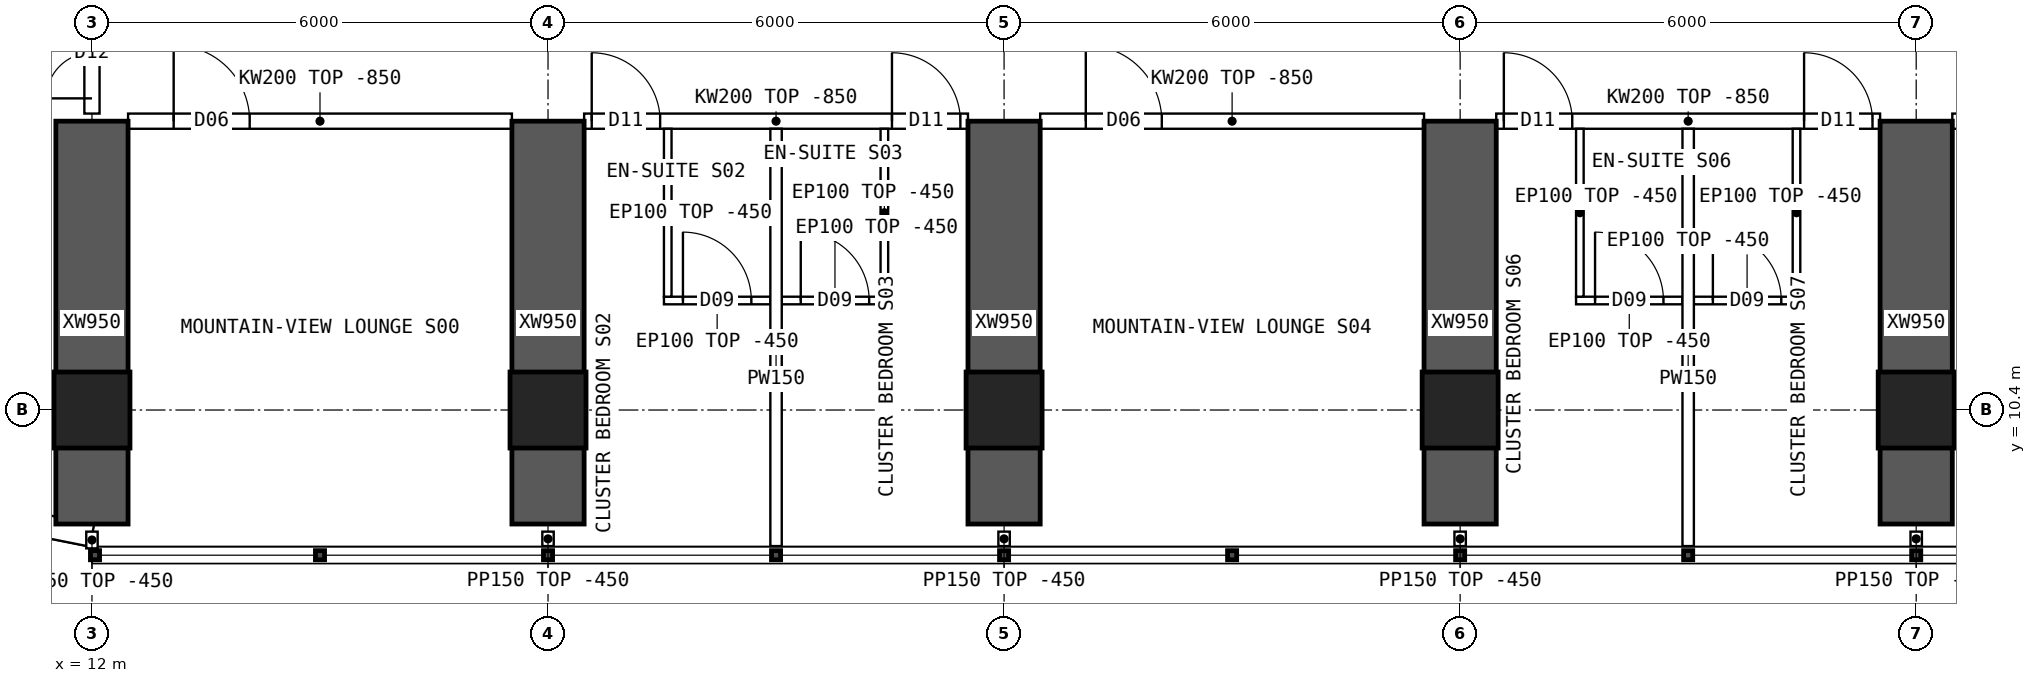
"""IFC4 building model, lengths in metres.
Left out: names, types, materials, properties, quantities, classifications, styles, units other than length and angle.
Written with IfcOpenShell. Run it as: python <this file> out.ifc"""

import sys

from ifc_helpers import new_model, si_unit, direction, frame, frame_2d, origin, origin_2d, place, context, subcontext, project, spatial, polyline, rectangle, hollow_rectangle, outline, extrude, element, fill, save


model = new_model("IFC4")
c1 = context("Model", 3, precision=1e-05, world=origin(), true_north=direction((0.0, 1.0)))
c2 = subcontext(c1, "Body", "Model", "MODEL_VIEW")
j1 = project(units=[si_unit("LENGTHUNIT", "METRE"), si_unit("PLANEANGLEUNIT", "RADIAN")], contexts=[c1])
p1 = place(None, origin())
s1 = spatial("IfcSite", under=j1, at=p1, CompositionType="ELEMENT")
p2 = place(p1, origin())
s2 = spatial("IfcBuilding", under=s1, at=p2, CompositionType="ELEMENT")
p3 = place(p2, frame((0.0, 0.0, 95.65)))
s3 = spatial("IfcBuildingStorey", under=s2, at=p3, CompositionType="ELEMENT", Elevation=95.65)
for number, where, z_axis, x_axis in (
    (1, (12.0, 10.4, 0.0), (0.0, 0.0, 1.0), (1.0, 0.0, 0.0)),
    (2, (18.0, 10.4, 0.0), (0.0, 0.0, 1.0), (1.0, 0.0, 0.0)),
    (3, (24.0, 10.4, 0.0), (0.0, 0.0, 1.0), (1.0, 0.0, 0.0)),
    (4, (30.0, 10.4, 0.0), (0.0, 0.0, 1.0), (1.0, 0.0, 0.0)),
    (5, (36.0, 10.4, 0.0), (0.0, 0.0, 1.0), (1.0, 0.0, 0.0)),
):
    element("IfcColumn", number, at=place(p3, frame(where, z_axis=z_axis, x_axis=x_axis)), inside=s3, PredefinedType="COLUMN", context=c2, shape_type="SweptSolid", body=[
        extrude(hollow_rectangle(XDim=1.0, YDim=1.0, WallThickness=0.1, at=origin_2d()), origin(), (0.0, 0.0, 1.0), 3.75),
    ])
for number, where, z_axis, x_axis in (
    (6, (12.0, 8.9, 0.0), (0.0, 0.0, 1.0), (0.0, 1.0, 0.0)),
    (7, (18.0, 8.9, 0.0), (0.0, 0.0, 1.0), (0.0, 1.0, 0.0)),
    (8, (24.0, 8.9, 0.0), (0.0, 0.0, 1.0), (0.0, 1.0, 0.0)),
    (9, (30.0, 8.9, 0.0), (0.0, 0.0, 1.0), (0.0, 1.0, 0.0)),
    (10, (36.0, 8.9, 0.0), (0.0, 0.0, 1.0), (0.0, 1.0, 0.0)),
):
    element("IfcWall", number, at=place(p3, frame(where, z_axis=z_axis, x_axis=x_axis)), inside=s3, PredefinedType="SHEAR", context=c2, shape_type="SweptSolid", body=[
        extrude(rectangle(XDim=5.3, YDim=0.95, at=frame_2d((2.65, 0.0))), origin(), (0.0, 0.0, 1.0), 3.75),
    ])
p4 = place(p3, frame((8.843, 9.378, 0.0), z_axis=(0.0, 0.0, 1.0), x_axis=(0.980787251524, -0.195080412259, 0.0)))
e11 = element("IfcWall", 11, at=p4, inside=s3, PredefinedType="SOLIDWALL", context=c2, shape_type="SweptSolid", body=[
    extrude(outline(polyline([(-0.03, -0.15), (3.249, -0.15), (3.189, 0.15), (0.03, 0.15), (-0.03, -0.15)])), origin(), (0.0, 0.0, 1.0), 3.3),
])
p5 = place(p4, frame((0.909, 0.0, 0.9)))
e12 = element("IfcOpeningElement", 12, at=p5, cuts=e11, PredefinedType="OPENING", context=c2, shape_type="SweptSolid", body=[
    extrude(rectangle(XDim=1.4, YDim=1.8, at=frame_2d((0.7, 0.9))), frame((0.0, 0.16, 0.0), z_axis=(0.0, -1.0, 0.0), x_axis=(1.0, 0.0, 0.0)), (0.0, 0.0, 1.0), 0.32),
])
p6 = place(p3, frame((12.475, 14.2, 0.0), z_axis=(0.0, 0.0, 1.0), x_axis=(1.0, 0.0, 0.0)))
e13 = element("IfcWall", 13, at=p6, inside=s3, PredefinedType="SOLIDWALL", context=c2, shape_type="SweptSolid", body=[
    extrude(outline(polyline([(0.0, 0.0), (5.05, 0.0), (5.05, 2.9), (0.0, 2.9), (0.0, 0.0)])), frame((0.0, 0.1, 0.0), z_axis=(0.0, -1.0, 0.0), x_axis=(1.0, 0.0, 0.0)), (0.0, 0.0, 1.0), 0.2),
])
p7 = place(p6, frame((0.6, 0.0, 0.0)))
e14 = element("IfcOpeningElement", 14, at=p7, cuts=e13, PredefinedType="OPENING", context=c2, shape_type="SweptSolid", body=[
    extrude(rectangle(XDim=1.0, YDim=2.1, at=frame_2d((0.5, 1.05))), frame((0.0, 0.11, 0.0), z_axis=(0.0, -1.0, 0.0), x_axis=(1.0, 0.0, 0.0)), (0.0, 0.0, 1.0), 0.22),
])
p8 = place(p3, frame((18.475, 14.2, 0.0), z_axis=(0.0, 0.0, 1.0), x_axis=(1.0, 0.0, 0.0)))
e15 = element("IfcWall", 15, at=p8, inside=s3, PredefinedType="SOLIDWALL", context=c2, shape_type="SweptSolid", body=[
    extrude(outline(polyline([(0.0, 0.0), (5.05, 0.0), (5.05, 2.9), (0.0, 2.9), (0.0, 0.0)])), frame((0.0, 0.1, 0.0), z_axis=(0.0, -1.0, 0.0), x_axis=(1.0, 0.0, 0.0)), (0.0, 0.0, 1.0), 0.2),
])
p9 = place(p8, frame((0.1, 0.0, 0.0)))
e16 = element("IfcOpeningElement", 16, at=p9, cuts=e15, PredefinedType="OPENING", context=c2, shape_type="SweptSolid", body=[
    extrude(rectangle(XDim=0.9, YDim=2.1, at=frame_2d((0.45, 1.05))), frame((0.0, 0.11, 0.0), z_axis=(0.0, -1.0, 0.0), x_axis=(1.0, 0.0, 0.0)), (0.0, 0.0, 1.0), 0.22),
])
p10 = place(p8, frame((4.05, 0.0, 0.0)))
e17 = element("IfcOpeningElement", 17, at=p10, cuts=e15, PredefinedType="OPENING", context=c2, shape_type="SweptSolid", body=[
    extrude(rectangle(XDim=0.9, YDim=2.1, at=frame_2d((0.45, 1.05))), frame((0.0, 0.11, 0.0), z_axis=(0.0, -1.0, 0.0), x_axis=(1.0, 0.0, 0.0)), (0.0, 0.0, 1.0), 0.22),
])
p11 = place(p3, frame((24.475, 14.2, 0.0), z_axis=(0.0, 0.0, 1.0), x_axis=(1.0, 0.0, 0.0)))
e18 = element("IfcWall", 18, at=p11, inside=s3, PredefinedType="SOLIDWALL", context=c2, shape_type="SweptSolid", body=[
    extrude(outline(polyline([(0.0, 0.0), (5.05, 0.0), (5.05, 2.9), (0.0, 2.9), (0.0, 0.0)])), frame((0.0, 0.1, 0.0), z_axis=(0.0, -1.0, 0.0), x_axis=(1.0, 0.0, 0.0)), (0.0, 0.0, 1.0), 0.2),
])
p12 = place(p11, frame((0.6, 0.0, 0.0)))
e19 = element("IfcOpeningElement", 19, at=p12, cuts=e18, PredefinedType="OPENING", context=c2, shape_type="SweptSolid", body=[
    extrude(rectangle(XDim=1.0, YDim=2.1, at=frame_2d((0.5, 1.05))), frame((0.0, 0.11, 0.0), z_axis=(0.0, -1.0, 0.0), x_axis=(1.0, 0.0, 0.0)), (0.0, 0.0, 1.0), 0.22),
])
p13 = place(p3, frame((30.475, 14.2, 0.0), z_axis=(0.0, 0.0, 1.0), x_axis=(1.0, 0.0, 0.0)))
e20 = element("IfcWall", 20, at=p13, inside=s3, PredefinedType="SOLIDWALL", context=c2, shape_type="SweptSolid", body=[
    extrude(outline(polyline([(0.0, 0.0), (5.05, 0.0), (5.05, 2.9), (0.0, 2.9), (0.0, 0.0)])), frame((0.0, 0.1, 0.0), z_axis=(0.0, -1.0, 0.0), x_axis=(1.0, 0.0, 0.0)), (0.0, 0.0, 1.0), 0.2),
])
p14 = place(p13, frame((0.1, 0.0, 0.0)))
e21 = element("IfcOpeningElement", 21, at=p14, cuts=e20, PredefinedType="OPENING", context=c2, shape_type="SweptSolid", body=[
    extrude(rectangle(XDim=0.9, YDim=2.1, at=frame_2d((0.45, 1.05))), frame((0.0, 0.11, 0.0), z_axis=(0.0, -1.0, 0.0), x_axis=(1.0, 0.0, 0.0)), (0.0, 0.0, 1.0), 0.22),
])
p15 = place(p13, frame((4.05, 0.0, 0.0)))
e22 = element("IfcOpeningElement", 22, at=p15, cuts=e20, PredefinedType="OPENING", context=c2, shape_type="SweptSolid", body=[
    extrude(rectangle(XDim=0.9, YDim=2.1, at=frame_2d((0.45, 1.05))), frame((0.0, 0.11, 0.0), z_axis=(0.0, -1.0, 0.0), x_axis=(1.0, 0.0, 0.0)), (0.0, 0.0, 1.0), 0.22),
])
p16 = place(p3, frame((36.475, 14.2, 0.0), z_axis=(0.0, 0.0, 1.0), x_axis=(1.0, 0.0, 0.0)))
e23 = element("IfcWall", 23, at=p16, inside=s3, PredefinedType="SOLIDWALL", context=c2, shape_type="SweptSolid", body=[
    extrude(outline(polyline([(0.0, 0.0), (5.05, 0.0), (5.05, 2.9), (0.0, 2.9), (0.0, 0.0)])), frame((0.0, 0.1, 0.0), z_axis=(0.0, -1.0, 0.0), x_axis=(1.0, 0.0, 0.0)), (0.0, 0.0, 1.0), 0.2),
])
p17 = place(p16, frame((0.3, 0.0, 0.0)))
e24 = element("IfcOpeningElement", 24, at=p17, cuts=e23, PredefinedType="OPENING", context=c2, shape_type="SweptSolid", body=[
    extrude(rectangle(XDim=1.0, YDim=2.1, at=frame_2d((0.5, 1.05))), frame((0.0, 0.11, 0.0), z_axis=(0.0, -1.0, 0.0), x_axis=(1.0, 0.0, 0.0)), (0.0, 0.0, 1.0), 0.22),
])
p18 = place(p3, frame((21.0, 8.61, 0.0), z_axis=(0.0, 0.0, 1.0), x_axis=(0.0, 1.0, 0.0)))
e25 = element("IfcWall", 25, at=p18, inside=s3, PredefinedType="PARTITIONING", context=c2, shape_type="SweptSolid", body=[
    extrude(outline(polyline([(0.0, 0.0), (5.49, 0.0), (5.49, 2.9), (5.442, 2.9), (5.44, 3.3), (1.992, 3.3), (1.99, 2.9), (1.592, 2.9), (1.59, 3.3), (0.0, 3.3), (0.0, 0.0)])), frame((0.0, 0.075, 0.0), z_axis=(0.0, -1.0, 0.0), x_axis=(1.0, 0.0, 0.0)), (0.0, 0.0, 1.0), 0.15),
])
p19 = place(p3, frame((20.925, 11.841, 0.0), z_axis=(0.0, 0.0, 1.0), x_axis=(-1.0, 0.0, 0.0)))
e26 = element("IfcWall", 26, at=p19, inside=s3, PredefinedType="PARTITIONING", context=c2, shape_type="SweptSolid", body=[
    extrude(rectangle(XDim=1.4, YDim=0.1, at=frame_2d((0.7, 0.0))), origin(), (0.0, 0.0, 1.0), 3.3),
])
p20 = place(p19, frame((0.25, 0.0, 0.0)))
e27 = element("IfcOpeningElement", 27, at=p20, cuts=e26, PredefinedType="OPENING", context=c2, shape_type="SweptSolid", body=[
    extrude(rectangle(XDim=0.9, YDim=2.1, at=frame_2d((0.45, 1.05))), frame((0.0, 0.06, 0.0), z_axis=(0.0, -1.0, 0.0), x_axis=(1.0, 0.0, 0.0)), (0.0, 0.0, 1.0), 0.12),
])
p21 = place(p3, frame((19.575, 11.891, 0.0), z_axis=(0.0, 0.0, 1.0), x_axis=(0.0, 1.0, 0.0)))
e28 = element("IfcWall", 28, at=p21, inside=s3, PredefinedType="PARTITIONING", context=c2, shape_type="SweptSolid", body=[
    extrude(outline(polyline([(0.0, 0.0), (2.209, 0.0), (2.209, 2.9), (2.161, 2.9), (2.159, 3.3), (0.0, 3.3), (0.0, 0.0)])), frame((0.0, 0.05, 0.0), z_axis=(0.0, -1.0, 0.0), x_axis=(1.0, 0.0, 0.0)), (0.0, 0.0, 1.0), 0.1),
])
p22 = place(p3, frame((22.475, 11.841, 0.0), z_axis=(0.0, 0.0, 1.0), x_axis=(-1.0, 0.0, 0.0)))
e29 = element("IfcWall", 29, at=p22, inside=s3, PredefinedType="PARTITIONING", context=c2, shape_type="SweptSolid", body=[
    extrude(rectangle(XDim=1.4, YDim=0.1, at=frame_2d((0.7, 0.0))), origin(), (0.0, 0.0, 1.0), 3.3),
])
p23 = place(p22, frame((0.25, 0.0, 0.0)))
e30 = element("IfcOpeningElement", 30, at=p23, cuts=e29, PredefinedType="OPENING", context=c2, shape_type="SweptSolid", body=[
    extrude(rectangle(XDim=0.9, YDim=2.1, at=frame_2d((0.45, 1.05))), frame((0.0, 0.06, 0.0), z_axis=(0.0, -1.0, 0.0), x_axis=(1.0, 0.0, 0.0)), (0.0, 0.0, 1.0), 0.12),
])
p24 = place(p3, frame((22.425, 11.891, 0.0), z_axis=(0.0, 0.0, 1.0), x_axis=(0.0, 1.0, 0.0)))
e31 = element("IfcWall", 31, at=p24, inside=s3, PredefinedType="PARTITIONING", context=c2, shape_type="SweptSolid", body=[
    extrude(outline(polyline([(0.0, 0.0), (2.209, 0.0), (2.209, 2.9), (2.161, 2.9), (2.159, 3.3), (0.0, 3.3), (0.0, 0.0)])), frame((0.0, 0.05, 0.0), z_axis=(0.0, -1.0, 0.0), x_axis=(1.0, 0.0, 0.0)), (0.0, 0.0, 1.0), 0.1),
])
p25 = place(p3, frame((33.0, 8.61, 0.0), z_axis=(0.0, 0.0, 1.0), x_axis=(0.0, 1.0, 0.0)))
e32 = element("IfcWall", 32, at=p25, inside=s3, PredefinedType="PARTITIONING", context=c2, shape_type="SweptSolid", body=[
    extrude(outline(polyline([(0.0, 0.0), (5.49, 0.0), (5.49, 2.9), (5.442, 2.9), (5.44, 3.3), (1.992, 3.3), (1.99, 2.9), (1.592, 2.9), (1.59, 3.3), (0.0, 3.3), (0.0, 0.0)])), frame((0.0, 0.075, 0.0), z_axis=(0.0, -1.0, 0.0), x_axis=(1.0, 0.0, 0.0)), (0.0, 0.0, 1.0), 0.15),
])
p26 = place(p3, frame((32.925, 11.841, 0.0), z_axis=(0.0, 0.0, 1.0), x_axis=(-1.0, 0.0, 0.0)))
e33 = element("IfcWall", 33, at=p26, inside=s3, PredefinedType="PARTITIONING", context=c2, shape_type="SweptSolid", body=[
    extrude(rectangle(XDim=1.4, YDim=0.1, at=frame_2d((0.7, 0.0))), origin(), (0.0, 0.0, 1.0), 3.3),
])
p27 = place(p26, frame((0.25, 0.0, 0.0)))
e34 = element("IfcOpeningElement", 34, at=p27, cuts=e33, PredefinedType="OPENING", context=c2, shape_type="SweptSolid", body=[
    extrude(rectangle(XDim=0.9, YDim=2.1, at=frame_2d((0.45, 1.05))), frame((0.0, 0.06, 0.0), z_axis=(0.0, -1.0, 0.0), x_axis=(1.0, 0.0, 0.0)), (0.0, 0.0, 1.0), 0.12),
])
p28 = place(p3, frame((31.575, 11.891, 0.0), z_axis=(0.0, 0.0, 1.0), x_axis=(0.0, 1.0, 0.0)))
e35 = element("IfcWall", 35, at=p28, inside=s3, PredefinedType="PARTITIONING", context=c2, shape_type="SweptSolid", body=[
    extrude(outline(polyline([(0.0, 0.0), (2.209, 0.0), (2.209, 2.9), (2.161, 2.9), (2.159, 3.3), (0.0, 3.3), (0.0, 0.0)])), frame((0.0, 0.05, 0.0), z_axis=(0.0, -1.0, 0.0), x_axis=(1.0, 0.0, 0.0)), (0.0, 0.0, 1.0), 0.1),
])
p29 = place(p3, frame((34.475, 11.841, 0.0), z_axis=(0.0, 0.0, 1.0), x_axis=(-1.0, 0.0, 0.0)))
e36 = element("IfcWall", 36, at=p29, inside=s3, PredefinedType="PARTITIONING", context=c2, shape_type="SweptSolid", body=[
    extrude(rectangle(XDim=1.4, YDim=0.1, at=frame_2d((0.7, 0.0))), origin(), (0.0, 0.0, 1.0), 3.3),
])
p30 = place(p29, frame((0.25, 0.0, 0.0)))
e37 = element("IfcOpeningElement", 37, at=p30, cuts=e36, PredefinedType="OPENING", context=c2, shape_type="SweptSolid", body=[
    extrude(rectangle(XDim=0.9, YDim=2.1, at=frame_2d((0.45, 1.05))), frame((0.0, 0.06, 0.0), z_axis=(0.0, -1.0, 0.0), x_axis=(1.0, 0.0, 0.0)), (0.0, 0.0, 1.0), 0.12),
])
p31 = place(p3, frame((34.425, 11.891, 0.0), z_axis=(0.0, 0.0, 1.0), x_axis=(0.0, 1.0, 0.0)))
e38 = element("IfcWall", 38, at=p31, inside=s3, PredefinedType="PARTITIONING", context=c2, shape_type="SweptSolid", body=[
    extrude(outline(polyline([(0.0, 0.0), (2.209, 0.0), (2.209, 2.9), (2.161, 2.9), (2.159, 3.3), (0.0, 3.3), (0.0, 0.0)])), frame((0.0, 0.05, 0.0), z_axis=(0.0, -1.0, 0.0), x_axis=(1.0, 0.0, 0.0)), (0.0, 0.0, 1.0), 0.1),
])
p32 = place(p3, frame((12.0, 14.3, 0.0), z_axis=(0.0, 0.0, 1.0), x_axis=(0.0, 1.0, 0.0)))
e39 = element("IfcWall", 39, at=p32, inside=s3, PredefinedType="SOLIDWALL", context=c2, shape_type="SweptSolid", body=[
    extrude(outline(polyline([(0.0, 0.0), (1.6, 0.0), (1.6, 2.9), (0.0, 2.9), (0.0, 0.0)])), frame((0.0, 0.1, 0.0), z_axis=(0.0, -1.0, 0.0), x_axis=(1.0, 0.0, 0.0)), (0.0, 0.0, 1.0), 0.2),
])
p33 = place(p32, frame((0.2, 0.0, 0.0)))
e40 = element("IfcOpeningElement", 40, at=p33, cuts=e39, PredefinedType="OPENING", context=c2, shape_type="SweptSolid", body=[
    extrude(rectangle(XDim=1.2, YDim=2.1, at=frame_2d((0.6, 1.05))), frame((0.0, 0.11, 0.0), z_axis=(0.0, -1.0, 0.0), x_axis=(1.0, 0.0, 0.0)), (0.0, 0.0, 1.0), 0.22),
])
p34 = place(p3, frame((12.0, 8.8, 0.0), z_axis=(0.0, 0.0, 1.0), x_axis=(0.0, -1.0, 0.0)))
e41 = element("IfcWall", 41, at=p34, inside=s3, PredefinedType="PARTITIONING", context=c2, shape_type="SweptSolid", body=[
    extrude(rectangle(XDim=0.22, YDim=0.15, at=frame_2d((0.11, 0.0))), origin(), (0.0, 0.0, 1.0), 3.3),
])
for number, where, z_axis, x_axis in (
    (42, (18.0, 8.8, 0.0), (0.0, 0.0, 1.0), (0.0, -1.0, 0.0)),
    (43, (24.0, 8.8, 0.0), (0.0, 0.0, 1.0), (0.0, -1.0, 0.0)),
    (44, (30.0, 8.8, 0.0), (0.0, 0.0, 1.0), (0.0, -1.0, 0.0)),
    (45, (36.0, 8.8, 0.0), (0.0, 0.0, 1.0), (0.0, -1.0, 0.0)),
):
    element("IfcWall", number, at=place(p3, frame(where, z_axis=z_axis, x_axis=x_axis)), inside=s3, PredefinedType="PARTITIONING", context=c2, shape_type="SweptSolid", body=[
        extrude(rectangle(XDim=0.19, YDim=0.15, at=frame_2d((0.095, 0.0))), origin(), (0.0, 0.0, 1.0), 3.3),
    ])
p35 = place(p7, origin())
e46 = element("IfcDoor", 46, at=p35, inside=s3, OperationType="SINGLE_SWING_LEFT", PredefinedType="DOOR", context=c2, shape_type="SweptSolid", body=[
    extrude(rectangle(XDim=1.0, YDim=2.1, at=frame_2d((0.5, 1.05))), frame((0.0, 0.025, 0.0), z_axis=(0.0, -1.0, 0.0), x_axis=(1.0, 0.0, 0.0)), (0.0, 0.0, 1.0), 0.05),
])
fill(e14, e46)
p36 = place(p20, origin())
e47 = element("IfcDoor", 47, at=p36, inside=s3, OperationType="SINGLE_SWING_RIGHT", PredefinedType="DOOR", context=c2, shape_type="SweptSolid", body=[
    extrude(rectangle(XDim=0.9, YDim=2.1, at=frame_2d((0.45, 1.05))), frame((0.0, 0.025, 0.0), z_axis=(0.0, -1.0, 0.0), x_axis=(1.0, 0.0, 0.0)), (0.0, 0.0, 1.0), 0.05),
])
fill(e27, e47)
p37 = place(p9, origin())
e48 = element("IfcDoor", 48, at=p37, inside=s3, OperationType="SINGLE_SWING_LEFT", PredefinedType="DOOR", context=c2, shape_type="SweptSolid", body=[
    extrude(rectangle(XDim=0.9, YDim=2.1, at=frame_2d((0.45, 1.05))), frame((0.0, 0.025, 0.0), z_axis=(0.0, -1.0, 0.0), x_axis=(1.0, 0.0, 0.0)), (0.0, 0.0, 1.0), 0.05),
])
fill(e16, e48)
p38 = place(p23, origin())
e49 = element("IfcDoor", 49, at=p38, inside=s3, OperationType="SINGLE_SWING_RIGHT", PredefinedType="DOOR", context=c2, shape_type="SweptSolid", body=[
    extrude(rectangle(XDim=0.9, YDim=2.1, at=frame_2d((0.45, 1.05))), frame((0.0, 0.025, 0.0), z_axis=(0.0, -1.0, 0.0), x_axis=(1.0, 0.0, 0.0)), (0.0, 0.0, 1.0), 0.05),
])
fill(e30, e49)
p39 = place(p10, origin())
e50 = element("IfcDoor", 50, at=p39, inside=s3, OperationType="SINGLE_SWING_LEFT", PredefinedType="DOOR", context=c2, shape_type="SweptSolid", body=[
    extrude(rectangle(XDim=0.9, YDim=2.1, at=frame_2d((0.45, 1.05))), frame((0.0, 0.025, 0.0), z_axis=(0.0, -1.0, 0.0), x_axis=(1.0, 0.0, 0.0)), (0.0, 0.0, 1.0), 0.05),
])
fill(e17, e50)
p40 = place(p12, origin())
e51 = element("IfcDoor", 51, at=p40, inside=s3, OperationType="SINGLE_SWING_LEFT", PredefinedType="DOOR", context=c2, shape_type="SweptSolid", body=[
    extrude(rectangle(XDim=1.0, YDim=2.1, at=frame_2d((0.5, 1.05))), frame((0.0, 0.025, 0.0), z_axis=(0.0, -1.0, 0.0), x_axis=(1.0, 0.0, 0.0)), (0.0, 0.0, 1.0), 0.05),
])
fill(e19, e51)
p41 = place(p27, origin())
e52 = element("IfcDoor", 52, at=p41, inside=s3, OperationType="SINGLE_SWING_RIGHT", PredefinedType="DOOR", context=c2, shape_type="SweptSolid", body=[
    extrude(rectangle(XDim=0.9, YDim=2.1, at=frame_2d((0.45, 1.05))), frame((0.0, 0.025, 0.0), z_axis=(0.0, -1.0, 0.0), x_axis=(1.0, 0.0, 0.0)), (0.0, 0.0, 1.0), 0.05),
])
fill(e34, e52)
p42 = place(p14, origin())
e53 = element("IfcDoor", 53, at=p42, inside=s3, OperationType="SINGLE_SWING_LEFT", PredefinedType="DOOR", context=c2, shape_type="SweptSolid", body=[
    extrude(rectangle(XDim=0.9, YDim=2.1, at=frame_2d((0.45, 1.05))), frame((0.0, 0.025, 0.0), z_axis=(0.0, -1.0, 0.0), x_axis=(1.0, 0.0, 0.0)), (0.0, 0.0, 1.0), 0.05),
])
fill(e21, e53)
p43 = place(p30, origin())
e54 = element("IfcDoor", 54, at=p43, inside=s3, OperationType="SINGLE_SWING_RIGHT", PredefinedType="DOOR", context=c2, shape_type="SweptSolid", body=[
    extrude(rectangle(XDim=0.9, YDim=2.1, at=frame_2d((0.45, 1.05))), frame((0.0, 0.025, 0.0), z_axis=(0.0, -1.0, 0.0), x_axis=(1.0, 0.0, 0.0)), (0.0, 0.0, 1.0), 0.05),
])
fill(e37, e54)
p44 = place(p15, origin())
e55 = element("IfcDoor", 55, at=p44, inside=s3, OperationType="SINGLE_SWING_LEFT", PredefinedType="DOOR", context=c2, shape_type="SweptSolid", body=[
    extrude(rectangle(XDim=0.9, YDim=2.1, at=frame_2d((0.45, 1.05))), frame((0.0, 0.025, 0.0), z_axis=(0.0, -1.0, 0.0), x_axis=(1.0, 0.0, 0.0)), (0.0, 0.0, 1.0), 0.05),
])
fill(e22, e55)
p45 = place(p33, origin())
e56 = element("IfcDoor", 56, at=p45, inside=s3, OperationType="DOUBLE_DOOR_SINGLE_SWING", PredefinedType="DOOR", context=c2, shape_type="SweptSolid", body=[
    extrude(rectangle(XDim=1.2, YDim=2.1, at=frame_2d((0.6, 1.05))), frame((0.0, 0.025, 0.0), z_axis=(0.0, -1.0, 0.0), x_axis=(1.0, 0.0, 0.0)), (0.0, 0.0, 1.0), 0.05),
])
fill(e40, e56)
save(model, sys.argv[1])
